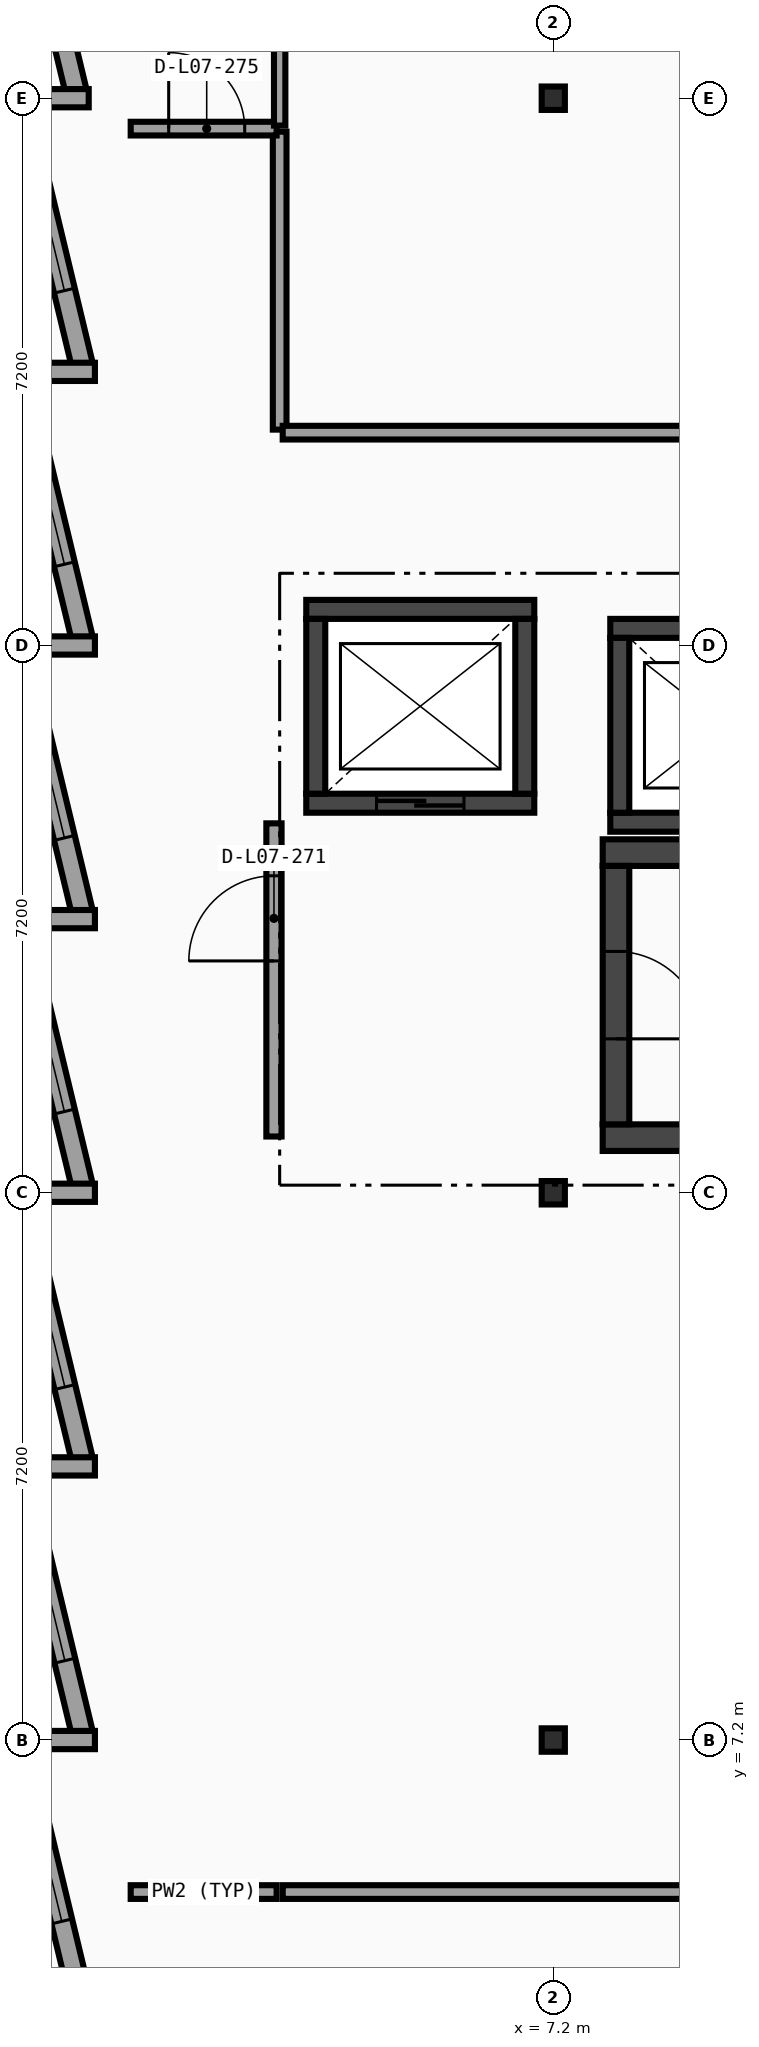
"""IFC4 building model, lengths in metres.
Left out: names, types, materials, properties, quantities, classifications, styles, units other than length and angle.
Written with IfcOpenShell. Run it as: python <this file> out.ifc"""

import sys

from ifc_helpers import new_model, si_unit, direction, frame, frame_2d, origin, origin_2d, place, context, subcontext, project, spatial, rectangle, i_section, extrude, element, fill, save


model = new_model("IFC4")
c1 = context("Model", 3, precision=1e-05, world=origin(), true_north=direction((0.0, 1.0)))
c2 = subcontext(c1, "Body", "Model", "MODEL_VIEW")
j1 = project(units=[si_unit("LENGTHUNIT", "METRE"), si_unit("PLANEANGLEUNIT", "RADIAN")], contexts=[c1])
p1 = place(None, origin())
s1 = spatial("IfcSite", under=j1, at=p1, CompositionType="ELEMENT")
p2 = place(p1, origin())
s2 = spatial("IfcBuilding", under=s1, at=p2, CompositionType="ELEMENT")
p3 = place(p2, frame((0.0, 0.0, 31.05)))
s3 = spatial("IfcBuildingStorey", under=s2, at=p3, CompositionType="ELEMENT", Elevation=31.05)
for number, where, z_axis, x_axis in (
    (1, (7.2, 7.2, 0.0), (0.0, 0.0, 1.0), (1.0, 0.0, 0.0)),
    (2, (7.2, 14.4, 0.0), (0.0, 0.0, 1.0), (1.0, 0.0, 0.0)),
    (3, (7.2, 28.8, 0.0), (0.0, 0.0, 1.0), (1.0, 0.0, 0.0)),
):
    element("IfcColumn", number, at=place(p3, frame(where, z_axis=z_axis, x_axis=x_axis)), inside=s3, PredefinedType="COLUMN", context=c2, shape_type="SweptSolid", body=[
        extrude(i_section(OverallWidth=0.305, OverallDepth=0.308, WebThickness=0.01, FlangeThickness=0.015, FilletRadius=0.015, at=origin_2d()), origin(), (0.0, 0.0, 1.0), 4.2),
    ])
p4 = place(p3, frame((0.16, 32.06, 0.0), z_axis=(0.0, 0.0, 1.0), x_axis=(0.233443812137, -0.972370292931, 0.0)))
e4 = element("IfcWall", 4, at=p4, inside=s3, PredefinedType="SOLIDWALL", context=c2, shape_type="SweptSolid", body=[
    extrude(rectangle(XDim=3.258, YDim=0.28, at=frame_2d((1.629, 0.0))), origin(), (0.0, 0.0, 1.0), 3.95),
])
p5 = place(p4, frame((0.829, 0.0, 0.8)))
e5 = element("IfcOpeningElement", 5, at=p5, cuts=e4, PredefinedType="OPENING", context=c2, shape_type="SweptSolid", body=[
    extrude(rectangle(XDim=1.6, YDim=1.75, at=frame_2d((0.8, 0.875))), frame((0.0, 0.15, 0.0), z_axis=(0.0, -1.0, 0.0), x_axis=(1.0, 0.0, 0.0)), (0.0, 0.0, 1.0), 0.3),
])
p6 = place(p3, frame((1.088, 28.8, 0.0), z_axis=(0.0, 0.0, 1.0), x_axis=(-1.0, 0.0, 0.0)))
e6 = element("IfcWall", 6, at=p6, inside=s3, PredefinedType="SOLIDWALL", context=c2, shape_type="SweptSolid", body=[
    extrude(rectangle(XDim=0.933, YDim=0.24, at=frame_2d((0.467, 0.0))), origin(), (0.0, 0.0, 1.0), 3.95),
])
p7 = place(p3, frame((0.16, 28.8, 0.0), z_axis=(0.0, 0.0, 1.0), x_axis=(0.233495818898, -0.972357805829, 0.0)))
e7 = element("IfcWall", 7, at=p7, inside=s3, PredefinedType="SOLIDWALL", context=c2, shape_type="SweptSolid", body=[
    extrude(rectangle(XDim=3.607, YDim=0.28, at=frame_2d((1.804, 0.0))), origin(), (0.0, 0.0, 1.0), 3.95),
])
p8 = place(p7, frame((1.004, 0.0, 0.8)))
e8 = element("IfcOpeningElement", 8, at=p8, cuts=e7, PredefinedType="OPENING", context=c2, shape_type="SweptSolid", body=[
    extrude(rectangle(XDim=1.6, YDim=1.75, at=frame_2d((0.8, 0.875))), frame((0.0, 0.15, 0.0), z_axis=(0.0, -1.0, 0.0), x_axis=(1.0, 0.0, 0.0)), (0.0, 0.0, 1.0), 0.3),
])
p9 = place(p3, frame((1.169, 25.2, 0.0), z_axis=(0.0, 0.0, 1.0), x_axis=(-1.0, 0.0, 0.0)))
e9 = element("IfcWall", 9, at=p9, inside=s3, PredefinedType="SOLIDWALL", context=c2, shape_type="SweptSolid", body=[
    extrude(rectangle(XDim=0.877, YDim=0.24, at=frame_2d((0.438, 0.0))), origin(), (0.0, 0.0, 1.0), 3.95),
])
p10 = place(p3, frame((0.16, 25.2, 0.0), z_axis=(0.0, 0.0, 1.0), x_axis=(0.233495818898, -0.972357805829, 0.0)))
e10 = element("IfcWall", 10, at=p10, inside=s3, PredefinedType="SOLIDWALL", context=c2, shape_type="SweptSolid", body=[
    extrude(rectangle(XDim=3.607, YDim=0.28, at=frame_2d((1.804, 0.0))), origin(), (0.0, 0.0, 1.0), 3.95),
])
p11 = place(p10, frame((1.004, 0.0, 0.8)))
e11 = element("IfcOpeningElement", 11, at=p11, cuts=e10, PredefinedType="OPENING", context=c2, shape_type="SweptSolid", body=[
    extrude(rectangle(XDim=1.6, YDim=1.75, at=frame_2d((0.8, 0.875))), frame((0.0, 0.15, 0.0), z_axis=(0.0, -1.0, 0.0), x_axis=(1.0, 0.0, 0.0)), (0.0, 0.0, 1.0), 0.3),
])
p12 = place(p3, frame((1.169, 21.6, 0.0), z_axis=(0.0, 0.0, 1.0), x_axis=(-1.0, 0.0, 0.0)))
e12 = element("IfcWall", 12, at=p12, inside=s3, PredefinedType="SOLIDWALL", context=c2, shape_type="SweptSolid", body=[
    extrude(rectangle(XDim=1.015, YDim=0.24, at=frame_2d((0.507, 0.0))), origin(), (0.0, 0.0, 1.0), 3.95),
])
p13 = place(p3, frame((0.16, 21.6, 0.0), z_axis=(0.0, 0.0, 1.0), x_axis=(0.233480453725, -0.972361495396, 0.0)))
e13 = element("IfcWall", 13, at=p13, inside=s3, PredefinedType="SOLIDWALL", context=c2, shape_type="SweptSolid", body=[
    extrude(rectangle(XDim=3.607, YDim=0.28, at=frame_2d((1.804, 0.0))), origin(), (0.0, 0.0, 1.0), 3.95),
])
p14 = place(p13, frame((1.004, 0.0, 0.8)))
e14 = element("IfcOpeningElement", 14, at=p14, cuts=e13, PredefinedType="OPENING", context=c2, shape_type="SweptSolid", body=[
    extrude(rectangle(XDim=1.6, YDim=1.75, at=frame_2d((0.8, 0.875))), frame((0.0, 0.15, 0.0), z_axis=(0.0, -1.0, 0.0), x_axis=(1.0, 0.0, 0.0)), (0.0, 0.0, 1.0), 0.3),
])
p15 = place(p3, frame((1.169, 18.0, 0.0), z_axis=(0.0, 0.0, 1.0), x_axis=(-1.0, 0.0, 0.0)))
e15 = element("IfcWall", 15, at=p15, inside=s3, PredefinedType="SOLIDWALL", context=c2, shape_type="SweptSolid", body=[
    extrude(rectangle(XDim=0.877, YDim=0.24, at=frame_2d((0.438, 0.0))), origin(), (0.0, 0.0, 1.0), 3.95),
])
p16 = place(p3, frame((0.16, 18.0, 0.0), z_axis=(0.0, 0.0, 1.0), x_axis=(0.233495818898, -0.972357805829, 0.0)))
e16 = element("IfcWall", 16, at=p16, inside=s3, PredefinedType="SOLIDWALL", context=c2, shape_type="SweptSolid", body=[
    extrude(rectangle(XDim=3.607, YDim=0.28, at=frame_2d((1.804, 0.0))), origin(), (0.0, 0.0, 1.0), 3.95),
])
p17 = place(p16, frame((1.004, 0.0, 0.8)))
e17 = element("IfcOpeningElement", 17, at=p17, cuts=e16, PredefinedType="OPENING", context=c2, shape_type="SweptSolid", body=[
    extrude(rectangle(XDim=1.6, YDim=1.75, at=frame_2d((0.8, 0.875))), frame((0.0, 0.15, 0.0), z_axis=(0.0, -1.0, 0.0), x_axis=(1.0, 0.0, 0.0)), (0.0, 0.0, 1.0), 0.3),
])
p18 = place(p3, frame((1.169, 14.4, 0.0), z_axis=(0.0, 0.0, 1.0), x_axis=(-1.0, 0.0, 0.0)))
e18 = element("IfcWall", 18, at=p18, inside=s3, PredefinedType="SOLIDWALL", context=c2, shape_type="SweptSolid", body=[
    extrude(rectangle(XDim=1.015, YDim=0.24, at=frame_2d((0.507, 0.0))), origin(), (0.0, 0.0, 1.0), 3.95),
])
p19 = place(p3, frame((0.16, 14.4, 0.0), z_axis=(0.0, 0.0, 1.0), x_axis=(0.233495818898, -0.972357805829, 0.0)))
e19 = element("IfcWall", 19, at=p19, inside=s3, PredefinedType="SOLIDWALL", context=c2, shape_type="SweptSolid", body=[
    extrude(rectangle(XDim=3.607, YDim=0.28, at=frame_2d((1.804, 0.0))), origin(), (0.0, 0.0, 1.0), 3.95),
])
p20 = place(p19, frame((0.979, 0.0, 0.8)))
e20 = element("IfcOpeningElement", 20, at=p20, cuts=e19, PredefinedType="OPENING", context=c2, shape_type="SweptSolid", body=[
    extrude(rectangle(XDim=1.65, YDim=1.9, at=frame_2d((0.825, 0.95))), frame((0.0, 0.15, 0.0), z_axis=(0.0, -1.0, 0.0), x_axis=(1.0, 0.0, 0.0)), (0.0, 0.0, 1.0), 0.3),
])
p21 = place(p3, frame((1.169, 10.8, 0.0), z_axis=(0.0, 0.0, 1.0), x_axis=(-1.0, 0.0, 0.0)))
e21 = element("IfcWall", 21, at=p21, inside=s3, PredefinedType="SOLIDWALL", context=c2, shape_type="SweptSolid", body=[
    extrude(rectangle(XDim=0.877, YDim=0.24, at=frame_2d((0.438, 0.0))), origin(), (0.0, 0.0, 1.0), 3.95),
])
p22 = place(p3, frame((0.16, 10.8, 0.0), z_axis=(0.0, 0.0, 1.0), x_axis=(0.233495818898, -0.972357805829, 0.0)))
e22 = element("IfcWall", 22, at=p22, inside=s3, PredefinedType="SOLIDWALL", context=c2, shape_type="SweptSolid", body=[
    extrude(rectangle(XDim=3.607, YDim=0.28, at=frame_2d((1.804, 0.0))), origin(), (0.0, 0.0, 1.0), 3.95),
])
p23 = place(p22, frame((0.979, 0.0, 0.8)))
e23 = element("IfcOpeningElement", 23, at=p23, cuts=e22, PredefinedType="OPENING", context=c2, shape_type="SweptSolid", body=[
    extrude(rectangle(XDim=1.65, YDim=1.9, at=frame_2d((0.825, 0.95))), frame((0.0, 0.15, 0.0), z_axis=(0.0, -1.0, 0.0), x_axis=(1.0, 0.0, 0.0)), (0.0, 0.0, 1.0), 0.3),
])
p24 = place(p3, frame((1.169, 7.2, 0.0), z_axis=(0.0, 0.0, 1.0), x_axis=(-1.0, 0.0, 0.0)))
e24 = element("IfcWall", 24, at=p24, inside=s3, PredefinedType="SOLIDWALL", context=c2, shape_type="SweptSolid", body=[
    extrude(rectangle(XDim=1.015, YDim=0.24, at=frame_2d((0.507, 0.0))), origin(), (0.0, 0.0, 1.0), 3.95),
])
p25 = place(p3, frame((0.16, 7.2, 0.0), z_axis=(0.0, 0.0, 1.0), x_axis=(0.233460824675, -0.972366208453, 0.0)))
e25 = element("IfcWall", 25, at=p25, inside=s3, PredefinedType="SOLIDWALL", context=c2, shape_type="SweptSolid", body=[
    extrude(rectangle(XDim=3.258, YDim=0.28, at=frame_2d((1.629, 0.0))), origin(), (0.0, 0.0, 1.0), 3.95),
])
p26 = place(p25, frame((0.804, 0.0, 0.8)))
e26 = element("IfcOpeningElement", 26, at=p26, cuts=e25, PredefinedType="OPENING", context=c2, shape_type="SweptSolid", body=[
    extrude(rectangle(XDim=1.65, YDim=1.9, at=frame_2d((0.825, 0.95))), frame((0.0, 0.15, 0.0), z_axis=(0.0, -1.0, 0.0), x_axis=(1.0, 0.0, 0.0)), (0.0, 0.0, 1.0), 0.3),
])
for number, where, z_axis, x_axis in (
    (27, (7.85, 15.125, 0.0), (0.0, 0.0, 1.0), (1.0, 0.0, 0.0)),
    (28, (17.15, 18.875, 0.0), (0.0, 0.0, 1.0), (-1.0, 0.0, 0.0)),
):
    element("IfcWall", number, at=place(p3, frame(where, z_axis=z_axis, x_axis=x_axis)), inside=s3, PredefinedType="SHEAR", context=c2, shape_type="SweptSolid", body=[
        extrude(rectangle(XDim=9.3, YDim=0.35, at=frame_2d((4.65, 0.0))), origin(), (0.0, 0.0, 1.0), 3.95),
    ])
p27 = place(p3, frame((8.025, 18.7, 0.0), z_axis=(0.0, 0.0, 1.0), x_axis=(0.0, -1.0, 0.0)))
e29 = element("IfcWall", 29, at=p27, inside=s3, PredefinedType="SHEAR", context=c2, shape_type="SweptSolid", body=[
    extrude(rectangle(XDim=3.4, YDim=0.35, at=frame_2d((1.7, 0.0))), origin(), (0.0, 0.0, 1.0), 3.95),
])
p28 = place(p27, frame((1.125, 0.0, 0.0)))
e30 = element("IfcOpeningElement", 30, at=p28, cuts=e29, PredefinedType="OPENING", context=c2, shape_type="SweptSolid", body=[
    extrude(rectangle(XDim=1.15, YDim=2.1, at=frame_2d((0.575, 1.05))), frame((0.0, 0.185, 0.0), z_axis=(0.0, -1.0, 0.0), x_axis=(1.0, 0.0, 0.0)), (0.0, 0.0, 1.0), 0.37),
])
p29 = place(p3, frame((3.95, 19.525, 0.0), z_axis=(0.0, 0.0, 1.0), x_axis=(1.0, 0.0, 0.0)))
e31 = element("IfcWall", 31, at=p29, inside=s3, PredefinedType="SHEAR", context=c2, shape_type="SweptSolid", body=[
    extrude(rectangle(XDim=3.0, YDim=0.25, at=frame_2d((1.5, 0.0))), origin(), (0.0, 0.0, 1.0), 3.95),
])
p30 = place(p29, frame((0.925, 0.0, 0.0)))
e32 = element("IfcOpeningElement", 32, at=p30, cuts=e31, PredefinedType="OPENING", context=c2, shape_type="SweptSolid", body=[
    extrude(rectangle(XDim=1.15, YDim=2.1, at=frame_2d((0.575, 1.05))), frame((0.0, 0.135, 0.0), z_axis=(0.0, -1.0, 0.0), x_axis=(1.0, 0.0, 0.0)), (0.0, 0.0, 1.0), 0.27),
])
p31 = place(p3, frame((6.95, 22.075, 0.0), z_axis=(0.0, 0.0, 1.0), x_axis=(-1.0, 0.0, 0.0)))
e33 = element("IfcWall", 33, at=p31, inside=s3, PredefinedType="SHEAR", context=c2, shape_type="SweptSolid", body=[
    extrude(rectangle(XDim=3.0, YDim=0.25, at=frame_2d((1.5, 0.0))), origin(), (0.0, 0.0, 1.0), 3.95),
])
for number, where, z_axis, x_axis in (
    (34, (4.075, 21.95, 0.0), (0.0, 0.0, 1.0), (0.0, -1.0, 0.0)),
    (35, (6.825, 19.65, 0.0), (0.0, 0.0, 1.0), (0.0, 1.0, 0.0)),
):
    element("IfcWall", number, at=place(p3, frame(where, z_axis=z_axis, x_axis=x_axis)), inside=s3, PredefinedType="SHEAR", context=c2, shape_type="SweptSolid", body=[
        extrude(rectangle(XDim=2.3, YDim=0.25, at=frame_2d((1.15, 0.0))), origin(), (0.0, 0.0, 1.0), 3.95),
    ])
p32 = place(p3, frame((7.95, 19.275, 0.0), z_axis=(0.0, 0.0, 1.0), x_axis=(1.0, 0.0, 0.0)))
e36 = element("IfcWall", 36, at=p32, inside=s3, PredefinedType="SHEAR", context=c2, shape_type="SweptSolid", body=[
    extrude(rectangle(XDim=3.0, YDim=0.25, at=frame_2d((1.5, 0.0))), origin(), (0.0, 0.0, 1.0), 3.95),
])
p33 = place(p3, frame((10.95, 21.825, 0.0), z_axis=(0.0, 0.0, 1.0), x_axis=(-1.0, 0.0, 0.0)))
e37 = element("IfcWall", 37, at=p33, inside=s3, PredefinedType="SHEAR", context=c2, shape_type="SweptSolid", body=[
    extrude(rectangle(XDim=3.0, YDim=0.25, at=frame_2d((1.5, 0.0))), origin(), (0.0, 0.0, 1.0), 3.95),
])
p34 = place(p33, frame((0.95, 0.0, 0.0)))
e38 = element("IfcOpeningElement", 38, at=p34, cuts=e37, PredefinedType="OPENING", context=c2, shape_type="SweptSolid", body=[
    extrude(rectangle(XDim=1.1, YDim=2.1, at=frame_2d((0.55, 1.05))), frame((0.0, 0.135, 0.0), z_axis=(0.0, -1.0, 0.0), x_axis=(1.0, 0.0, 0.0)), (0.0, 0.0, 1.0), 0.27),
])
p35 = place(p3, frame((8.075, 21.7, 0.0), z_axis=(0.0, 0.0, 1.0), x_axis=(0.0, -1.0, 0.0)))
e39 = element("IfcWall", 39, at=p35, inside=s3, PredefinedType="SHEAR", context=c2, shape_type="SweptSolid", body=[
    extrude(rectangle(XDim=2.3, YDim=0.25, at=frame_2d((1.15, 0.0))), origin(), (0.0, 0.0, 1.0), 3.95),
])
p36 = place(p3, frame((3.525, 15.14, 0.0), z_axis=(0.0, 0.0, 1.0), x_axis=(0.0, 1.0, 0.0)))
e40 = element("IfcWall", 40, at=p36, inside=s3, PredefinedType="PARTITIONING", context=c2, shape_type="SweptSolid", body=[
    extrude(rectangle(XDim=4.12, YDim=0.2, at=frame_2d((2.06, 0.0))), origin(), (0.0, 0.0, 1.0), 3.95),
])
p37 = place(p36, frame((2.31, 0.0, 0.0)))
e41 = element("IfcOpeningElement", 41, at=p37, cuts=e40, PredefinedType="OPENING", context=c2, shape_type="SweptSolid", body=[
    extrude(rectangle(XDim=1.12, YDim=2.1, at=frame_2d((0.56, 1.05))), frame((0.0, 0.11, 0.0), z_axis=(0.0, -1.0, 0.0), x_axis=(1.0, 0.0, 0.0)), (0.0, 0.0, 1.0), 0.22),
])
p38 = place(p3, frame((1.64, 5.2, 0.0), z_axis=(0.0, 0.0, 1.0), x_axis=(1.0, 0.0, 0.0)))
e42 = element("IfcWall", 42, at=p38, inside=s3, PredefinedType="PARTITIONING", context=c2, shape_type="SweptSolid", body=[
    extrude(rectangle(XDim=1.92, YDim=0.18, at=frame_2d((0.96, 0.0))), origin(), (0.0, 0.0, 1.0), 3.95),
])
p39 = place(p3, frame((3.6, 24.44, 0.0), z_axis=(0.0, 0.0, 1.0), x_axis=(0.0, 1.0, 0.0)))
e43 = element("IfcWall", 43, at=p39, inside=s3, PredefinedType="PARTITIONING", context=c2, shape_type="SweptSolid", body=[
    extrude(rectangle(XDim=3.92, YDim=0.18, at=frame_2d((1.96, 0.0))), origin(), (0.0, 0.0, 1.0), 3.95),
])
p40 = place(p3, frame((1.64, 28.4, 0.0), z_axis=(0.0, 0.0, 1.0), x_axis=(1.0, 0.0, 0.0)))
e44 = element("IfcWall", 44, at=p40, inside=s3, PredefinedType="PARTITIONING", context=c2, shape_type="SweptSolid", body=[
    extrude(rectangle(XDim=1.92, YDim=0.18, at=frame_2d((0.96, 0.0))), origin(), (0.0, 0.0, 1.0), 3.95),
])
p41 = place(p40, frame((0.5, 0.0, 0.0)))
e45 = element("IfcOpeningElement", 45, at=p41, cuts=e44, PredefinedType="OPENING", context=c2, shape_type="SweptSolid", body=[
    extrude(rectangle(XDim=1.0, YDim=2.1, at=frame_2d((0.5, 1.05))), frame((0.0, 0.1, 0.0), z_axis=(0.0, -1.0, 0.0), x_axis=(1.0, 0.0, 0.0)), (0.0, 0.0, 1.0), 0.2),
])
p42 = place(p3, frame((3.64, 24.4, 0.0), z_axis=(0.0, 0.0, 1.0), x_axis=(1.0, 0.0, 0.0)))
e46 = element("IfcWall", 46, at=p42, inside=s3, PredefinedType="PARTITIONING", context=c2, shape_type="SweptSolid", body=[
    extrude(rectangle(XDim=17.32, YDim=0.18, at=frame_2d((8.66, 0.0))), origin(), (0.0, 0.0, 1.0), 3.95),
])
p43 = place(p42, frame((6.225, 0.0, 0.0)))
e47 = element("IfcOpeningElement", 47, at=p43, cuts=e46, PredefinedType="OPENING", context=c2, shape_type="SweptSolid", body=[
    extrude(rectangle(XDim=1.0, YDim=2.1, at=frame_2d((0.5, 1.05))), frame((0.0, 0.1, 0.0), z_axis=(0.0, -1.0, 0.0), x_axis=(1.0, 0.0, 0.0)), (0.0, 0.0, 1.0), 0.2),
])
p44 = place(p3, frame((3.64, 5.2, 0.0), z_axis=(0.0, 0.0, 1.0), x_axis=(1.0, 0.0, 0.0)))
e48 = element("IfcWall", 48, at=p44, inside=s3, PredefinedType="PARTITIONING", context=c2, shape_type="SweptSolid", body=[
    extrude(rectangle(XDim=24.52, YDim=0.18, at=frame_2d((12.26, 0.0))), origin(), (0.0, 0.0, 1.0), 3.95),
])
p45 = place(p44, frame((5.965, 0.0, 0.0)))
e49 = element("IfcOpeningElement", 49, at=p45, cuts=e48, PredefinedType="OPENING", context=c2, shape_type="SweptSolid", body=[
    extrude(rectangle(XDim=1.5, YDim=2.1, at=frame_2d((0.75, 1.05))), frame((0.0, 0.1, 0.0), z_axis=(0.0, -1.0, 0.0), x_axis=(1.0, 0.0, 0.0)), (0.0, 0.0, 1.0), 0.2),
])
p46 = place(p3, frame((3.6, 28.44, 0.0), z_axis=(0.0, 0.0, 1.0), x_axis=(0.0, 1.0, 0.0)))
e50 = element("IfcWall", 50, at=p46, inside=s3, PredefinedType="PARTITIONING", context=c2, shape_type="SweptSolid", body=[
    extrude(rectangle(XDim=6.92, YDim=0.15, at=frame_2d((3.46, 0.0))), origin(), (0.0, 0.0, 1.0), 3.95),
])
p47 = place(p8, origin())
e51 = element("IfcWindow", 51, at=p47, inside=s3, PartitioningType="SINGLE_PANEL", PredefinedType="WINDOW", context=c2, shape_type="SweptSolid", body=[
    extrude(rectangle(XDim=1.6, YDim=1.75, at=frame_2d((0.8, 0.875))), frame((0.0, 0.03, 0.0), z_axis=(0.0, -1.0, 0.0), x_axis=(1.0, 0.0, 0.0)), (0.0, 0.0, 1.0), 0.06),
])
fill(e8, e51)
p48 = place(p11, origin())
e52 = element("IfcWindow", 52, at=p48, inside=s3, PartitioningType="SINGLE_PANEL", PredefinedType="WINDOW", context=c2, shape_type="SweptSolid", body=[
    extrude(rectangle(XDim=1.6, YDim=1.75, at=frame_2d((0.8, 0.875))), frame((0.0, 0.03, 0.0), z_axis=(0.0, -1.0, 0.0), x_axis=(1.0, 0.0, 0.0)), (0.0, 0.0, 1.0), 0.06),
])
fill(e11, e52)
p49 = place(p14, origin())
e53 = element("IfcWindow", 53, at=p49, inside=s3, PartitioningType="SINGLE_PANEL", PredefinedType="WINDOW", context=c2, shape_type="SweptSolid", body=[
    extrude(rectangle(XDim=1.6, YDim=1.75, at=frame_2d((0.8, 0.875))), frame((0.0, 0.03, 0.0), z_axis=(0.0, -1.0, 0.0), x_axis=(1.0, 0.0, 0.0)), (0.0, 0.0, 1.0), 0.06),
])
fill(e14, e53)
p50 = place(p17, origin())
e54 = element("IfcWindow", 54, at=p50, inside=s3, PartitioningType="SINGLE_PANEL", PredefinedType="WINDOW", context=c2, shape_type="SweptSolid", body=[
    extrude(rectangle(XDim=1.6, YDim=1.75, at=frame_2d((0.8, 0.875))), frame((0.0, 0.03, 0.0), z_axis=(0.0, -1.0, 0.0), x_axis=(1.0, 0.0, 0.0)), (0.0, 0.0, 1.0), 0.06),
])
fill(e17, e54)
p51 = place(p20, origin())
e55 = element("IfcWindow", 55, at=p51, inside=s3, PartitioningType="SINGLE_PANEL", PredefinedType="WINDOW", context=c2, shape_type="SweptSolid", body=[
    extrude(rectangle(XDim=1.65, YDim=1.9, at=frame_2d((0.825, 0.95))), frame((0.0, 0.03, 0.0), z_axis=(0.0, -1.0, 0.0), x_axis=(1.0, 0.0, 0.0)), (0.0, 0.0, 1.0), 0.06),
])
fill(e20, e55)
p52 = place(p23, origin())
e56 = element("IfcWindow", 56, at=p52, inside=s3, PartitioningType="SINGLE_PANEL", PredefinedType="WINDOW", context=c2, shape_type="SweptSolid", body=[
    extrude(rectangle(XDim=1.65, YDim=1.9, at=frame_2d((0.825, 0.95))), frame((0.0, 0.03, 0.0), z_axis=(0.0, -1.0, 0.0), x_axis=(1.0, 0.0, 0.0)), (0.0, 0.0, 1.0), 0.06),
])
fill(e23, e56)
p53 = place(p26, origin())
e57 = element("IfcWindow", 57, at=p53, inside=s3, PartitioningType="SINGLE_PANEL", PredefinedType="WINDOW", context=c2, shape_type="SweptSolid", body=[
    extrude(rectangle(XDim=1.65, YDim=1.9, at=frame_2d((0.825, 0.95))), frame((0.0, 0.03, 0.0), z_axis=(0.0, -1.0, 0.0), x_axis=(1.0, 0.0, 0.0)), (0.0, 0.0, 1.0), 0.06),
])
fill(e26, e57)
p54 = place(p28, frame((1.15, 0.0, 0.0), z_axis=(0.0, 0.0, 1.0), x_axis=(-1.0, 0.0, 0.0)))
e58 = element("IfcDoor", 58, at=p54, inside=s3, OperationType="SINGLE_SWING_LEFT", PredefinedType="DOOR", context=c2, shape_type="SweptSolid", body=[
    extrude(rectangle(XDim=1.15, YDim=2.1, at=frame_2d((0.575, 1.05))), frame((0.0, 0.025, 0.0), z_axis=(0.0, -1.0, 0.0), x_axis=(1.0, 0.0, 0.0)), (0.0, 0.0, 1.0), 0.05),
])
fill(e30, e58)
p55 = place(p30, origin())
e59 = element("IfcDoor", 59, at=p55, inside=s3, OperationType="SLIDING_TO_RIGHT", PredefinedType="DOOR", context=c2, shape_type="SweptSolid", body=[
    extrude(rectangle(XDim=1.15, YDim=2.1, at=frame_2d((0.575, 1.05))), frame((0.0, 0.025, 0.0), z_axis=(0.0, -1.0, 0.0), x_axis=(1.0, 0.0, 0.0)), (0.0, 0.0, 1.0), 0.05),
])
fill(e32, e59)
p56 = place(p37, origin())
e60 = element("IfcDoor", 60, at=p56, inside=s3, OperationType="SINGLE_SWING_LEFT", PredefinedType="DOOR", context=c2, shape_type="SweptSolid", body=[
    extrude(rectangle(XDim=1.12, YDim=2.1, at=frame_2d((0.56, 1.05))), frame((0.0, 0.025, 0.0), z_axis=(0.0, -1.0, 0.0), x_axis=(1.0, 0.0, 0.0)), (0.0, 0.0, 1.0), 0.05),
])
fill(e41, e60)
p57 = place(p41, origin())
e61 = element("IfcDoor", 61, at=p57, inside=s3, OperationType="SINGLE_SWING_LEFT", PredefinedType="DOOR", context=c2, shape_type="SweptSolid", body=[
    extrude(rectangle(XDim=1.0, YDim=2.1, at=frame_2d((0.5, 1.05))), frame((0.0, 0.025, 0.0), z_axis=(0.0, -1.0, 0.0), x_axis=(1.0, 0.0, 0.0)), (0.0, 0.0, 1.0), 0.05),
])
fill(e45, e61)
save(model, sys.argv[1])
